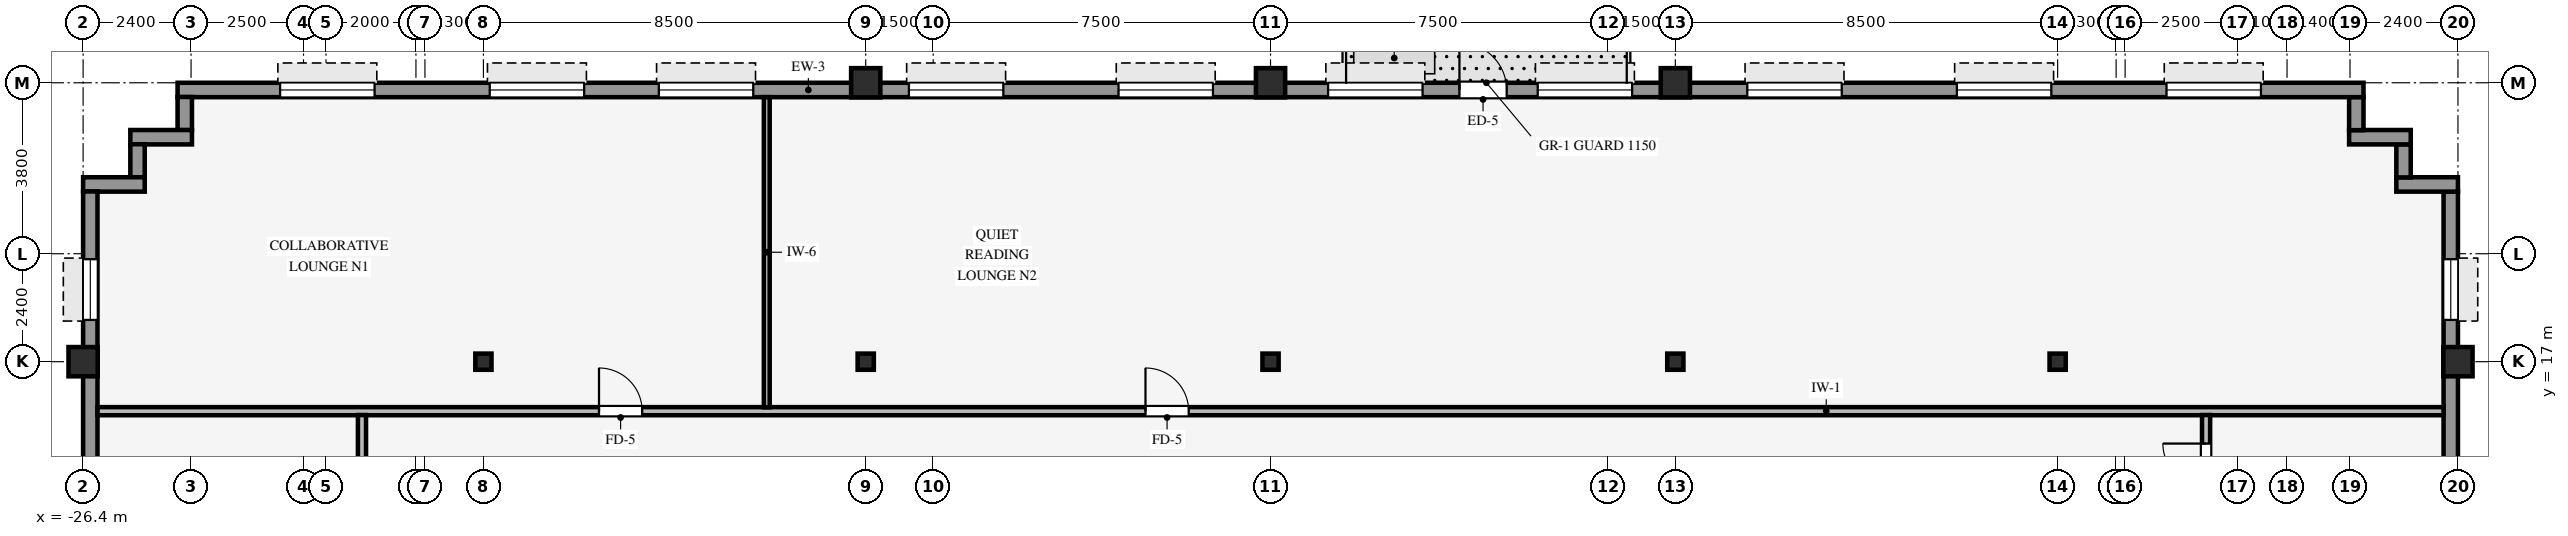
"""IFC4 building model, lengths in metres.
Left out: names, types, materials, properties, quantities, classifications, styles, units other than length and angle.
Written with IfcOpenShell. Run it as: python <this file> out.ifc"""

import sys

from ifc_helpers import new_model, si_unit, direction, frame, frame_2d, origin, origin_2d, place, context, subcontext, project, spatial, rectangle, hollow_rectangle, i_section, extrude, source, transform, mapped, element, fill, save


model = new_model("IFC4")
c1 = context("Model", 3, precision=1e-05, world=origin(), true_north=direction((0.0, 1.0)))
c2 = subcontext(c1, "Body", "Model", "MODEL_VIEW")
j1 = project(units=[si_unit("LENGTHUNIT", "METRE"), si_unit("PLANEANGLEUNIT", "RADIAN")], contexts=[c1])
p1 = place(None, origin())
s1 = spatial("IfcSite", under=j1, at=p1, CompositionType="ELEMENT")
p2 = place(p1, origin())
s2 = spatial("IfcBuilding", under=s1, at=p2, CompositionType="ELEMENT")
p3 = place(p2, frame((0.0, 0.0, 123.85)))
s3 = spatial("IfcBuildingStorey", under=s2, at=p3, CompositionType="ELEMENT", Elevation=123.85)
for number, where, z_axis, x_axis in (
    (1, (-26.4, 17.0, 0.0), (0.0, 0.0, 1.0), (1.0, 0.0, 0.0)),
    (2, (26.4, 17.0, 0.0), (0.0, 0.0, 1.0), (1.0, 0.0, 0.0)),
    (3, (-9.0, 23.2, 0.0), (0.0, 0.0, 1.0), (1.0, 0.0, 0.0)),
    (4, (0.0, 23.2, 0.0), (0.0, 0.0, 1.0), (1.0, 0.0, 0.0)),
    (5, (9.0, 23.2, 0.0), (0.0, 0.0, 1.0), (1.0, 0.0, 0.0)),
):
    element("IfcColumn", number, at=place(p3, frame(where, z_axis=z_axis, x_axis=x_axis)), inside=s3, PredefinedType="COLUMN", context=c2, shape_type="SweptSolid", body=[
        extrude(hollow_rectangle(XDim=0.65, YDim=0.65, WallThickness=0.04, InnerFilletRadius=0.04, OuterFilletRadius=0.08, at=origin_2d()), origin(), (0.0, 0.0, 1.0), 3.37),
    ])
for number, where, z_axis, x_axis in (
    (6, (0.0, 17.0, 0.0), (0.0, 0.0, 1.0), (1.0, 0.0, 0.0)),
    (7, (-17.5, 17.0, 0.0), (0.0, 0.0, 1.0), (1.0, 0.0, 0.0)),
    (8, (-9.0, 17.0, 0.0), (0.0, 0.0, 1.0), (1.0, 0.0, 0.0)),
    (9, (9.0, 17.0, 0.0), (0.0, 0.0, 1.0), (1.0, 0.0, 0.0)),
    (10, (17.5, 17.0, 0.0), (0.0, 0.0, 1.0), (1.0, 0.0, 0.0)),
):
    element("IfcColumn", number, at=place(p3, frame(where, z_axis=z_axis, x_axis=x_axis)), inside=s3, PredefinedType="COLUMN", context=c2, shape_type="SweptSolid", body=[
        extrude(i_section(OverallWidth=0.36, OverallDepth=0.36, WebThickness=0.021, FlangeThickness=0.021, FilletRadius=0.018, at=origin_2d()), origin(), (0.0, 0.0, 1.0), 3.37),
    ])
p4 = place(p3, frame((26.24, 3.6, 0.0), z_axis=(0.0, 0.0, 1.0), x_axis=(0.0, 1.0, 0.0)))
e11 = element("IfcWall", 11, at=p4, inside=s3, PredefinedType="STANDARD", context=c2, shape_type="SweptSolid", body=[
    extrude(rectangle(XDim=17.184, YDim=0.32, at=frame_2d((8.592, 0.0))), origin(), (0.0, 0.0, 1.0), 2.705),
])
p5 = place(p4, frame((2.856, 0.0, 0.8)))
e12 = element("IfcOpeningElement", 12, at=p5, cuts=e11, PredefinedType="OPENING", context=c2, shape_type="SweptSolid", body=[
    extrude(rectangle(XDim=1.35, YDim=1.56, at=frame_2d((0.675, 0.78))), frame((0.0, 0.17, 0.0), z_axis=(0.0, -1.0, 0.0), x_axis=(1.0, 0.0, 0.0)), (0.0, 0.0, 1.0), 0.34),
])
p6 = place(p4, frame((7.917, 0.0, 0.8)))
e13 = element("IfcOpeningElement", 13, at=p6, cuts=e11, PredefinedType="OPENING", context=c2, shape_type="SweptSolid", body=[
    extrude(rectangle(XDim=1.35, YDim=1.56, at=frame_2d((0.675, 0.78))), frame((0.0, 0.17, 0.0), z_axis=(0.0, -1.0, 0.0), x_axis=(1.0, 0.0, 0.0)), (0.0, 0.0, 1.0), 0.34),
])
p7 = place(p4, frame((14.328, 0.0, 0.8)))
e14 = element("IfcOpeningElement", 14, at=p7, cuts=e11, PredefinedType="OPENING", context=c2, shape_type="SweptSolid", body=[
    extrude(rectangle(XDim=1.35, YDim=1.56, at=frame_2d((0.675, 0.78))), frame((0.0, 0.17, 0.0), z_axis=(0.0, -1.0, 0.0), x_axis=(1.0, 0.0, 0.0)), (0.0, 0.0, 1.0), 0.34),
])
p8 = place(p3, frame((25.03, 20.94, 0.0), z_axis=(0.0, 0.0, 1.0), x_axis=(1.0, 0.0, 0.0)))
e15 = element("IfcWall", 15, at=p8, inside=s3, PredefinedType="STANDARD", context=c2, shape_type="SweptSolid", body=[
    extrude(rectangle(XDim=1.37, YDim=0.32, at=frame_2d((0.685, 0.0))), origin(), (0.0, 0.0, 1.0), 3.36),
])
p9 = place(p3, frame((25.19, 21.096, 0.0), z_axis=(0.0, 0.0, 1.0), x_axis=(0.0, 1.0, 0.0)))
e16 = element("IfcWall", 16, at=p9, inside=s3, PredefinedType="STANDARD", context=c2, shape_type="SweptSolid", body=[
    extrude(rectangle(XDim=0.738, YDim=0.32, at=frame_2d((0.369, 0.0))), origin(), (0.0, 0.0, 1.0), 3.36),
])
p10 = place(p3, frame((23.98, 21.99, 0.0), z_axis=(0.0, 0.0, 1.0), x_axis=(1.0, 0.0, 0.0)))
e17 = element("IfcWall", 17, at=p10, inside=s3, PredefinedType="STANDARD", context=c2, shape_type="SweptSolid", body=[
    extrude(rectangle(XDim=1.37, YDim=0.32, at=frame_2d((0.685, 0.0))), origin(), (0.0, 0.0, 1.0), 3.36),
])
p11 = place(p3, frame((24.14, 22.146, 0.0), z_axis=(0.0, 0.0, 1.0), x_axis=(0.0, 1.0, 0.0)))
e18 = element("IfcWall", 18, at=p11, inside=s3, PredefinedType="STANDARD", context=c2, shape_type="SweptSolid", body=[
    extrude(rectangle(XDim=0.738, YDim=0.32, at=frame_2d((0.369, 0.0))), origin(), (0.0, 0.0, 1.0), 3.36),
])
p12 = place(p3, frame((-24.3, 23.04, 0.0), z_axis=(0.0, 0.0, 1.0), x_axis=(1.0, 0.0, 0.0)))
e19 = element("IfcWall", 19, at=p12, inside=s3, PredefinedType="STANDARD", context=c2, shape_type="SweptSolid", body=[
    extrude(rectangle(XDim=48.6, YDim=0.32, at=frame_2d((24.3, 0.0))), origin(), (0.0, 0.0, 1.0), 2.705),
])
p13 = place(p12, frame((28.5, 0.0, 0.0)))
e20 = element("IfcOpeningElement", 20, at=p13, cuts=e19, PredefinedType="OPENING", context=c2, shape_type="SweptSolid", body=[
    extrude(rectangle(XDim=1.05, YDim=2.1, at=frame_2d((0.525, 1.05))), frame((0.0, 0.17, 0.0), z_axis=(0.0, -1.0, 0.0), x_axis=(1.0, 0.0, 0.0)), (0.0, 0.0, 1.0), 0.34),
])
p14 = place(p12, frame((2.28, 0.0, 0.8)))
e21 = element("IfcOpeningElement", 21, at=p14, cuts=e19, PredefinedType="OPENING", context=c2, shape_type="SweptSolid", body=[
    extrude(rectangle(XDim=2.1, YDim=1.56, at=frame_2d((1.05, 0.78))), frame((0.0, 0.17, 0.0), z_axis=(0.0, -1.0, 0.0), x_axis=(1.0, 0.0, 0.0)), (0.0, 0.0, 1.0), 0.34),
])
p15 = place(p12, frame((6.94, 0.0, 0.8)))
e22 = element("IfcOpeningElement", 22, at=p15, cuts=e19, PredefinedType="OPENING", context=c2, shape_type="SweptSolid", body=[
    extrude(rectangle(XDim=2.1, YDim=1.56, at=frame_2d((1.05, 0.78))), frame((0.0, 0.17, 0.0), z_axis=(0.0, -1.0, 0.0), x_axis=(1.0, 0.0, 0.0)), (0.0, 0.0, 1.0), 0.34),
])
p16 = place(p12, frame((10.7, 0.0, 0.8)))
e23 = element("IfcOpeningElement", 23, at=p16, cuts=e19, PredefinedType="OPENING", context=c2, shape_type="SweptSolid", body=[
    extrude(rectangle(XDim=2.1, YDim=1.56, at=frame_2d((1.05, 0.78))), frame((0.0, 0.17, 0.0), z_axis=(0.0, -1.0, 0.0), x_axis=(1.0, 0.0, 0.0)), (0.0, 0.0, 1.0), 0.34),
])
p17 = place(p12, frame((16.26, 0.0, 0.8)))
e24 = element("IfcOpeningElement", 24, at=p17, cuts=e19, PredefinedType="OPENING", context=c2, shape_type="SweptSolid", body=[
    extrude(rectangle(XDim=2.1, YDim=1.56, at=frame_2d((1.05, 0.78))), frame((0.0, 0.17, 0.0), z_axis=(0.0, -1.0, 0.0), x_axis=(1.0, 0.0, 0.0)), (0.0, 0.0, 1.0), 0.34),
])
p18 = place(p12, frame((20.92, 0.0, 0.8)))
e25 = element("IfcOpeningElement", 25, at=p18, cuts=e19, PredefinedType="OPENING", context=c2, shape_type="SweptSolid", body=[
    extrude(rectangle(XDim=2.1, YDim=1.56, at=frame_2d((1.05, 0.78))), frame((0.0, 0.17, 0.0), z_axis=(0.0, -1.0, 0.0), x_axis=(1.0, 0.0, 0.0)), (0.0, 0.0, 1.0), 0.34),
])
p19 = place(p12, frame((25.58, 0.0, 0.8)))
e26 = element("IfcOpeningElement", 26, at=p19, cuts=e19, PredefinedType="OPENING", context=c2, shape_type="SweptSolid", body=[
    extrude(rectangle(XDim=2.1, YDim=1.56, at=frame_2d((1.05, 0.78))), frame((0.0, 0.17, 0.0), z_axis=(0.0, -1.0, 0.0), x_axis=(1.0, 0.0, 0.0)), (0.0, 0.0, 1.0), 0.34),
])
p20 = place(p12, frame((30.24, 0.0, 0.8)))
e27 = element("IfcOpeningElement", 27, at=p20, cuts=e19, PredefinedType="OPENING", context=c2, shape_type="SweptSolid", body=[
    extrude(rectangle(XDim=2.1, YDim=1.56, at=frame_2d((1.05, 0.78))), frame((0.0, 0.17, 0.0), z_axis=(0.0, -1.0, 0.0), x_axis=(1.0, 0.0, 0.0)), (0.0, 0.0, 1.0), 0.34),
])
p21 = place(p12, frame((34.9, 0.0, 0.8)))
e28 = element("IfcOpeningElement", 28, at=p21, cuts=e19, PredefinedType="OPENING", context=c2, shape_type="SweptSolid", body=[
    extrude(rectangle(XDim=2.1, YDim=1.56, at=frame_2d((1.05, 0.78))), frame((0.0, 0.17, 0.0), z_axis=(0.0, -1.0, 0.0), x_axis=(1.0, 0.0, 0.0)), (0.0, 0.0, 1.0), 0.34),
])
p22 = place(p12, frame((39.56, 0.0, 0.8)))
e29 = element("IfcOpeningElement", 29, at=p22, cuts=e19, PredefinedType="OPENING", context=c2, shape_type="SweptSolid", body=[
    extrude(rectangle(XDim=2.1, YDim=1.56, at=frame_2d((1.05, 0.78))), frame((0.0, 0.17, 0.0), z_axis=(0.0, -1.0, 0.0), x_axis=(1.0, 0.0, 0.0)), (0.0, 0.0, 1.0), 0.34),
])
p23 = place(p12, frame((44.22, 0.0, 0.8)))
e30 = element("IfcOpeningElement", 30, at=p23, cuts=e19, PredefinedType="OPENING", context=c2, shape_type="SweptSolid", body=[
    extrude(rectangle(XDim=2.1, YDim=1.56, at=frame_2d((1.05, 0.78))), frame((0.0, 0.17, 0.0), z_axis=(0.0, -1.0, 0.0), x_axis=(1.0, 0.0, 0.0)), (0.0, 0.0, 1.0), 0.34),
])
p24 = place(p3, frame((-24.14, 22.146, 0.0), z_axis=(0.0, 0.0, 1.0), x_axis=(0.0, 1.0, 0.0)))
e31 = element("IfcWall", 31, at=p24, inside=s3, PredefinedType="STANDARD", context=c2, shape_type="SweptSolid", body=[
    extrude(rectangle(XDim=0.738, YDim=0.32, at=frame_2d((0.369, 0.0))), origin(), (0.0, 0.0, 1.0), 3.36),
])
p25 = place(p3, frame((-25.35, 21.99, 0.0), z_axis=(0.0, 0.0, 1.0), x_axis=(1.0, 0.0, 0.0)))
e32 = element("IfcWall", 32, at=p25, inside=s3, PredefinedType="STANDARD", context=c2, shape_type="SweptSolid", body=[
    extrude(rectangle(XDim=1.37, YDim=0.32, at=frame_2d((0.685, 0.0))), origin(), (0.0, 0.0, 1.0), 3.36),
])
p26 = place(p3, frame((-25.19, 21.096, 0.0), z_axis=(0.0, 0.0, 1.0), x_axis=(0.0, 1.0, 0.0)))
e33 = element("IfcWall", 33, at=p26, inside=s3, PredefinedType="STANDARD", context=c2, shape_type="SweptSolid", body=[
    extrude(rectangle(XDim=0.738, YDim=0.32, at=frame_2d((0.369, 0.0))), origin(), (0.0, 0.0, 1.0), 3.36),
])
p27 = place(p3, frame((-26.4, 20.94, 0.0), z_axis=(0.0, 0.0, 1.0), x_axis=(1.0, 0.0, 0.0)))
e34 = element("IfcWall", 34, at=p27, inside=s3, PredefinedType="STANDARD", context=c2, shape_type="SweptSolid", body=[
    extrude(rectangle(XDim=1.37, YDim=0.32, at=frame_2d((0.685, 0.0))), origin(), (0.0, 0.0, 1.0), 3.36),
])
p28 = place(p3, frame((-26.24, 3.6, 0.0), z_axis=(0.0, 0.0, 1.0), x_axis=(0.0, 1.0, 0.0)))
e35 = element("IfcWall", 35, at=p28, inside=s3, PredefinedType="STANDARD", context=c2, shape_type="SweptSolid", body=[
    extrude(rectangle(XDim=17.184, YDim=0.32, at=frame_2d((8.592, 0.0))), origin(), (0.0, 0.0, 1.0), 2.705),
])
p29 = place(p28, frame((2.856, 0.0, 0.8)))
e36 = element("IfcOpeningElement", 36, at=p29, cuts=e35, PredefinedType="OPENING", context=c2, shape_type="SweptSolid", body=[
    extrude(rectangle(XDim=1.35, YDim=1.56, at=frame_2d((0.675, 0.78))), frame((0.0, 0.17, 0.0), z_axis=(0.0, -1.0, 0.0), x_axis=(1.0, 0.0, 0.0)), (0.0, 0.0, 1.0), 0.34),
])
p30 = place(p28, frame((7.917, 0.0, 0.8)))
e37 = element("IfcOpeningElement", 37, at=p30, cuts=e35, PredefinedType="OPENING", context=c2, shape_type="SweptSolid", body=[
    extrude(rectangle(XDim=1.35, YDim=1.56, at=frame_2d((0.675, 0.78))), frame((0.0, 0.17, 0.0), z_axis=(0.0, -1.0, 0.0), x_axis=(1.0, 0.0, 0.0)), (0.0, 0.0, 1.0), 0.34),
])
p31 = place(p28, frame((14.328, 0.0, 0.8)))
e38 = element("IfcOpeningElement", 38, at=p31, cuts=e35, PredefinedType="OPENING", context=c2, shape_type="SweptSolid", body=[
    extrude(rectangle(XDim=1.35, YDim=1.56, at=frame_2d((0.675, 0.78))), frame((0.0, 0.17, 0.0), z_axis=(0.0, -1.0, 0.0), x_axis=(1.0, 0.0, 0.0)), (0.0, 0.0, 1.0), 0.34),
])
p32 = place(p3, frame((-26.08, 15.9, 0.0), z_axis=(0.0, 0.0, 1.0), x_axis=(1.0, 0.0, 0.0)))
e39 = element("IfcWall", 39, at=p32, inside=s3, PredefinedType="PARTITIONING", context=c2, shape_type="SweptSolid", body=[
    extrude(rectangle(XDim=52.16, YDim=0.18, at=frame_2d((26.08, 0.0))), origin(), (0.0, 0.0, 1.0), 3.36),
])
p33 = place(p32, frame((23.3, 0.0, 0.0)))
e40 = element("IfcOpeningElement", 40, at=p33, cuts=e39, PredefinedType="OPENING", context=c2, shape_type="SweptSolid", body=[
    extrude(rectangle(XDim=0.96, YDim=2.1, at=frame_2d((0.48, 1.05))), frame((0.0, 0.1, 0.0), z_axis=(0.0, -1.0, 0.0), x_axis=(1.0, 0.0, 0.0)), (0.0, 0.0, 1.0), 0.2),
])
p34 = place(p32, frame((11.15, 0.0, 0.0)))
e41 = element("IfcOpeningElement", 41, at=p34, cuts=e39, PredefinedType="OPENING", context=c2, shape_type="SweptSolid", body=[
    extrude(rectangle(XDim=0.96, YDim=2.1, at=frame_2d((0.48, 1.05))), frame((0.0, 0.1, 0.0), z_axis=(0.0, -1.0, 0.0), x_axis=(1.0, 0.0, 0.0)), (0.0, 0.0, 1.0), 0.2),
])
p35 = place(p3, frame((-20.2, -15.814, 0.0), z_axis=(0.0, 0.0, 1.0), x_axis=(0.0, 1.0, 0.0)))
e42 = element("IfcWall", 42, at=p35, inside=s3, PredefinedType="PARTITIONING", context=c2, shape_type="SweptSolid", body=[
    extrude(rectangle(XDim=31.628, YDim=0.18, at=frame_2d((15.814, 0.0))), origin(), (0.0, 0.0, 1.0), 3.36),
])
p36 = place(p35, frame((15.334, 0.0, 0.0)))
e43 = element("IfcOpeningElement", 43, at=p36, cuts=e42, PredefinedType="OPENING", context=c2, shape_type="SweptSolid", body=[
    extrude(rectangle(XDim=0.96, YDim=2.1, at=frame_2d((0.48, 1.05))), frame((0.0, 0.1, 0.0), z_axis=(0.0, -1.0, 0.0), x_axis=(1.0, 0.0, 0.0)), (0.0, 0.0, 1.0), 0.2),
])
p37 = place(p3, frame((-11.2, 15.986, 0.0), z_axis=(0.0, 0.0, 1.0), x_axis=(0.0, 1.0, 0.0)))
e44 = element("IfcWall", 44, at=p37, inside=s3, PredefinedType="PARTITIONING", context=c2, shape_type="SweptSolid", body=[
    extrude(rectangle(XDim=6.894, YDim=0.13, at=frame_2d((3.447, 0.0))), origin(), (0.0, 0.0, 1.0), 3.36),
])
p38 = place(p3, frame((20.8, 13.586, 0.0), z_axis=(0.0, 0.0, 1.0), x_axis=(0.0, 1.0, 0.0)))
e45 = element("IfcWall", 45, at=p38, inside=s3, PredefinedType="PARTITIONING", context=c2, shape_type="SweptSolid", body=[
    extrude(rectangle(XDim=2.228, YDim=0.18, at=frame_2d((1.114, 0.0))), origin(), (0.0, 0.0, 1.0), 3.36),
])
p39 = place(p38, frame((0.634, 0.0, 0.0)))
e46 = element("IfcOpeningElement", 46, at=p39, cuts=e45, PredefinedType="OPENING", context=c2, shape_type="SweptSolid", body=[
    extrude(rectangle(XDim=0.96, YDim=2.1, at=frame_2d((0.48, 1.05))), frame((0.0, 0.1, 0.0), z_axis=(0.0, -1.0, 0.0), x_axis=(1.0, 0.0, 0.0)), (0.0, 0.0, 1.0), 0.2),
])
m1 = source(origin(), c2, "Body", "SweptSolid", [
    extrude(rectangle(XDim=1.35, YDim=1.56, at=frame_2d((0.675, 0.78))), frame((0.0, 0.03, 0.0), z_axis=(0.0, -1.0, 0.0), x_axis=(1.0, 0.0, 0.0)), (0.0, 0.0, 1.0), 0.06),
])
p40 = place(p7, origin())
e47 = element("IfcWindow", 47, at=p40, inside=s3, PartitioningType="SINGLE_PANEL", PredefinedType="WINDOW", context=c2, shape_type="MappedRepresentation", body=[
    mapped(m1, transform((0.0, 0.0, 0.0), scale=1.0)),
])
fill(e14, e47)
m2 = source(origin(), c2, "Body", "SweptSolid", [
    extrude(rectangle(XDim=1.05, YDim=2.1, at=frame_2d((0.525, 1.05))), frame((0.0, 0.025, 0.0), z_axis=(0.0, -1.0, 0.0), x_axis=(1.0, 0.0, 0.0)), (0.0, 0.0, 1.0), 0.05),
])
p41 = place(p13, origin())
e48 = element("IfcDoor", 48, at=p41, inside=s3, OperationType="SINGLE_SWING_LEFT", PredefinedType="DOOR", context=c2, shape_type="MappedRepresentation", body=[
    mapped(m2, transform((0.0, 0.0, 0.0), scale=1.0)),
])
fill(e20, e48)
m3 = source(origin(), c2, "Body", "SweptSolid", [
    extrude(rectangle(XDim=2.1, YDim=1.56, at=frame_2d((1.05, 0.78))), frame((0.0, 0.03, 0.0), z_axis=(0.0, -1.0, 0.0), x_axis=(1.0, 0.0, 0.0)), (0.0, 0.0, 1.0), 0.06),
])
p42 = place(p14, origin())
e49 = element("IfcWindow", 49, at=p42, inside=s3, PartitioningType="SINGLE_PANEL", PredefinedType="WINDOW", context=c2, shape_type="MappedRepresentation", body=[
    mapped(m3, transform((0.0, 0.0, 0.0), scale=1.0)),
])
fill(e21, e49)
p43 = place(p15, origin())
e50 = element("IfcWindow", 50, at=p43, inside=s3, PartitioningType="SINGLE_PANEL", PredefinedType="WINDOW", context=c2, shape_type="MappedRepresentation", body=[
    mapped(m3, transform((0.0, 0.0, 0.0), scale=1.0)),
])
fill(e22, e50)
p44 = place(p16, origin())
e51 = element("IfcWindow", 51, at=p44, inside=s3, PartitioningType="SINGLE_PANEL", PredefinedType="WINDOW", context=c2, shape_type="MappedRepresentation", body=[
    mapped(m3, transform((0.0, 0.0, 0.0), scale=1.0)),
])
fill(e23, e51)
p45 = place(p17, origin())
e52 = element("IfcWindow", 52, at=p45, inside=s3, PartitioningType="SINGLE_PANEL", PredefinedType="WINDOW", context=c2, shape_type="MappedRepresentation", body=[
    mapped(m3, transform((0.0, 0.0, 0.0), scale=1.0)),
])
fill(e24, e52)
p46 = place(p18, origin())
e53 = element("IfcWindow", 53, at=p46, inside=s3, PartitioningType="SINGLE_PANEL", PredefinedType="WINDOW", context=c2, shape_type="MappedRepresentation", body=[
    mapped(m3, transform((0.0, 0.0, 0.0), scale=1.0)),
])
fill(e25, e53)
p47 = place(p19, origin())
e54 = element("IfcWindow", 54, at=p47, inside=s3, PartitioningType="SINGLE_PANEL", PredefinedType="WINDOW", context=c2, shape_type="MappedRepresentation", body=[
    mapped(m3, transform((0.0, 0.0, 0.0), scale=1.0)),
])
fill(e26, e54)
p48 = place(p20, origin())
e55 = element("IfcWindow", 55, at=p48, inside=s3, PartitioningType="SINGLE_PANEL", PredefinedType="WINDOW", context=c2, shape_type="MappedRepresentation", body=[
    mapped(m3, transform((0.0, 0.0, 0.0), scale=1.0)),
])
fill(e27, e55)
p49 = place(p21, origin())
e56 = element("IfcWindow", 56, at=p49, inside=s3, PartitioningType="SINGLE_PANEL", PredefinedType="WINDOW", context=c2, shape_type="MappedRepresentation", body=[
    mapped(m3, transform((0.0, 0.0, 0.0), scale=1.0)),
])
fill(e28, e56)
p50 = place(p22, origin())
e57 = element("IfcWindow", 57, at=p50, inside=s3, PartitioningType="SINGLE_PANEL", PredefinedType="WINDOW", context=c2, shape_type="MappedRepresentation", body=[
    mapped(m3, transform((0.0, 0.0, 0.0), scale=1.0)),
])
fill(e29, e57)
p51 = place(p23, origin())
e58 = element("IfcWindow", 58, at=p51, inside=s3, PartitioningType="SINGLE_PANEL", PredefinedType="WINDOW", context=c2, shape_type="MappedRepresentation", body=[
    mapped(m3, transform((0.0, 0.0, 0.0), scale=1.0)),
])
fill(e30, e58)
p52 = place(p31, origin())
e59 = element("IfcWindow", 59, at=p52, inside=s3, PartitioningType="SINGLE_PANEL", PredefinedType="WINDOW", context=c2, shape_type="MappedRepresentation", body=[
    mapped(m1, transform((0.0, 0.0, 0.0), scale=1.0)),
])
fill(e38, e59)
m4 = source(origin(), c2, "Body", "SweptSolid", [
    extrude(rectangle(XDim=0.96, YDim=2.1, at=frame_2d((0.48, 1.05))), frame((0.0, 0.025, 0.0), z_axis=(0.0, -1.0, 0.0), x_axis=(1.0, 0.0, 0.0)), (0.0, 0.0, 1.0), 0.05),
])
p53 = place(p33, origin())
e60 = element("IfcDoor", 60, at=p53, inside=s3, OperationType="SINGLE_SWING_LEFT", PredefinedType="DOOR", context=c2, shape_type="MappedRepresentation", body=[
    mapped(m4, transform((0.0, 0.0, 0.0), scale=1.0)),
])
fill(e40, e60)
p54 = place(p34, origin())
e61 = element("IfcDoor", 61, at=p54, inside=s3, OperationType="SINGLE_SWING_LEFT", PredefinedType="DOOR", context=c2, shape_type="MappedRepresentation", body=[
    mapped(m4, transform((0.0, 0.0, 0.0), scale=1.0)),
])
fill(e41, e61)
p55 = place(p39, origin())
e62 = element("IfcDoor", 62, at=p55, inside=s3, OperationType="SINGLE_SWING_RIGHT", PredefinedType="DOOR", context=c2, shape_type="MappedRepresentation", body=[
    mapped(m4, transform((0.0, 0.0, 0.0), scale=1.0)),
])
fill(e46, e62)
save(model, sys.argv[1])
